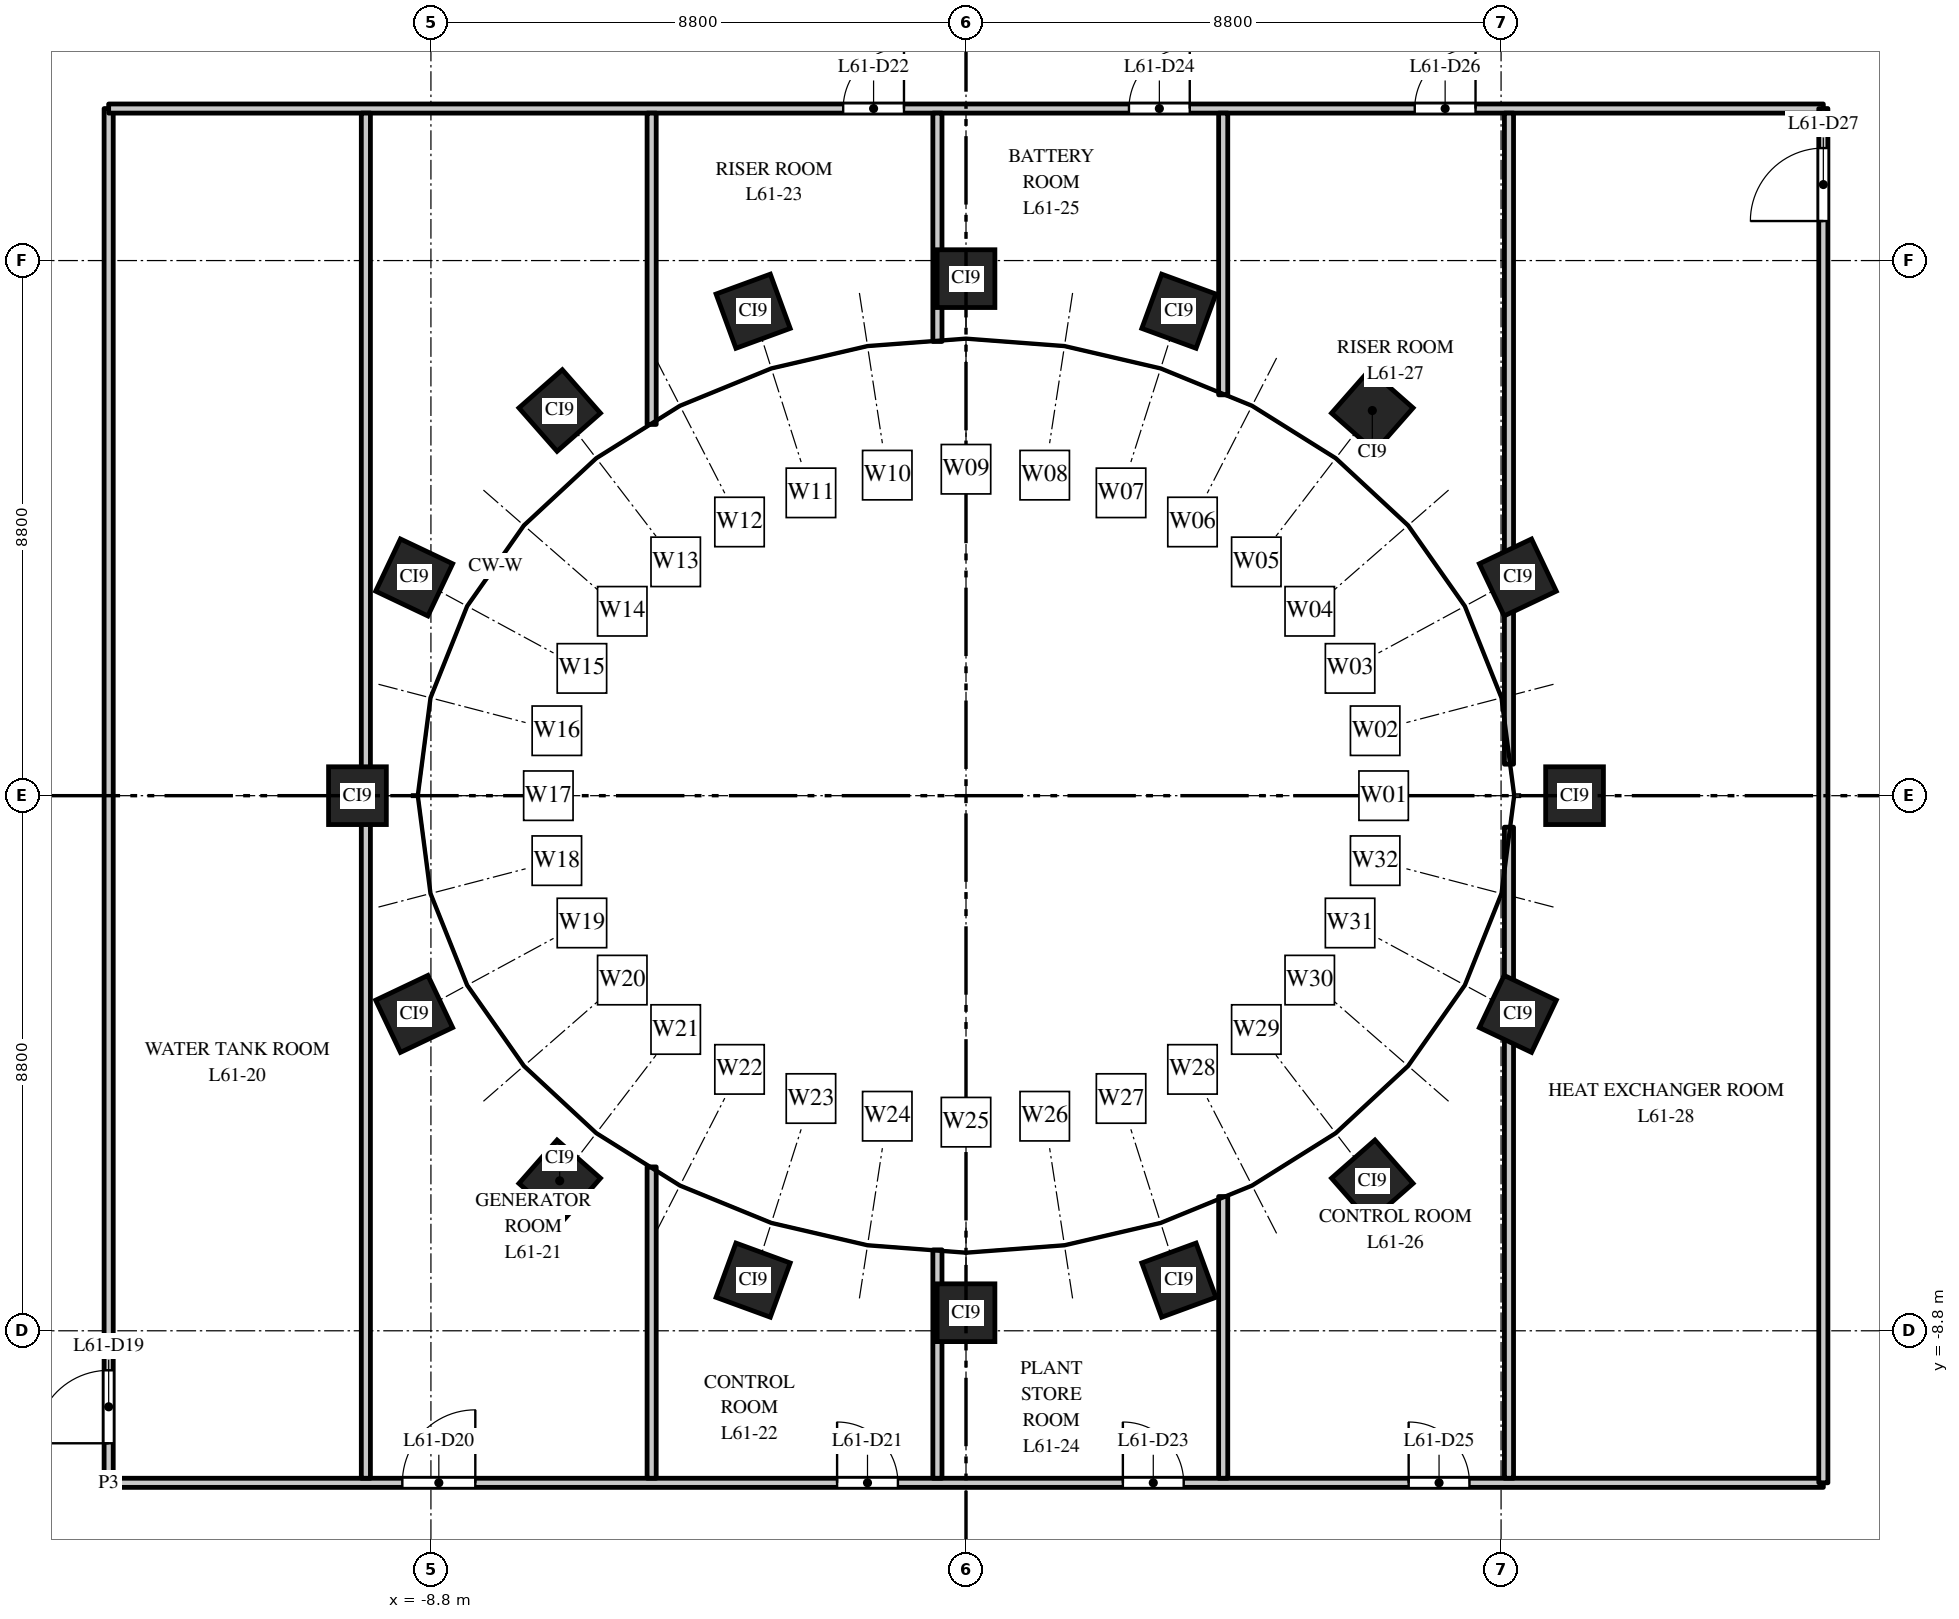
"""IFC4 building model, lengths in metres.
Left out: names, types, materials, properties, quantities, classifications, styles, units other than length and angle.
Written with IfcOpenShell. Run it as: python <this file> out.ifc"""

import sys

from ifc_helpers import new_model, si_unit, direction, frame, frame_2d, origin, origin_2d, place, context, subcontext, project, spatial, rectangle, extrude, element, fill, save


model = new_model("IFC4")
c1 = context("Model", 3, precision=1e-05, world=origin(), true_north=direction((0.0, 1.0)))
c2 = subcontext(c1, "Body", "Model", "MODEL_VIEW")
j1 = project(units=[si_unit("LENGTHUNIT", "METRE"), si_unit("PLANEANGLEUNIT", "RADIAN")], contexts=[c1])
p1 = place(None, origin())
s1 = spatial("IfcSite", under=j1, at=p1, CompositionType="ELEMENT")
p2 = place(p1, origin())
s2 = spatial("IfcBuilding", under=s1, at=p2, CompositionType="ELEMENT")
p3 = place(p2, frame((0.0, 0.0, 285.5)))
s3 = spatial("IfcBuildingStorey", under=s2, at=p3, CompositionType="ELEMENT", Elevation=285.5)
for number, where, z_axis, x_axis in (
    (1, (10.008, 0.0, 0.0), (0.0, 0.0, 1.0), (0.0, 1.0, 0.0)),
    (2, (9.076, 3.588, 0.0), (0.0, 0.0, 1.0), (-0.429, 0.903, 0.0)),
    (3, (6.682, 6.334, 0.0), (0.0, 0.0, 1.0), (-0.751, 0.66, 0.0)),
    (4, (3.501, 7.967, 0.0), (0.0, 0.0, 1.0), (-0.939, 0.344, 0.0)),
    (5, (0.0, 8.503, 0.0), (0.0, 0.0, 1.0), (-1.0, 0.0, 0.0)),
    (6, (-3.501, 7.967, 0.0), (0.0, 0.0, 1.0), (-0.939, -0.344, 0.0)),
    (7, (-6.682, 6.334, 0.0), (0.0, 0.0, 1.0), (-0.751, -0.66, 0.0)),
    (8, (-9.076, 3.588, 0.0), (0.0, 0.0, 1.0), (-0.429, -0.903, 0.0)),
    (9, (-10.008, 0.0, 0.0), (0.0, 0.0, 1.0), (0.0, -1.0, 0.0)),
    (10, (-9.076, -3.588, 0.0), (0.0, 0.0, 1.0), (0.429, -0.903, 0.0)),
    (11, (-6.682, -6.334, 0.0), (0.0, 0.0, 1.0), (0.751, -0.66, 0.0)),
    (12, (-3.501, -7.967, 0.0), (0.0, 0.0, 1.0), (0.939, -0.344, 0.0)),
    (13, (0.0, -8.503, 0.0), (0.0, 0.0, 1.0), (1.0, 0.0, 0.0)),
    (14, (3.501, -7.967, 0.0), (0.0, 0.0, 1.0), (0.939, 0.344, 0.0)),
    (15, (6.682, -6.334, 0.0), (0.0, 0.0, 1.0), (0.751, 0.66, 0.0)),
    (16, (9.076, -3.588, 0.0), (0.0, 0.0, 1.0), (0.429, 0.903, 0.0)),
):
    element("IfcColumn", number, at=place(p3, frame(where, z_axis=z_axis, x_axis=x_axis)), inside=s3, PredefinedType="COLUMN", context=c2, shape_type="SweptSolid", body=[
        extrude(rectangle(XDim=0.95, YDim=0.95, at=origin_2d()), origin(), (0.0, 0.0, 1.0), 5.5),
    ])
p4 = place(p3, frame((-14.1, -11.3, 0.0), z_axis=(0.0, 0.0, 1.0), x_axis=(0.0, 1.0, 0.0)))
e17 = element("IfcWall", 17, at=p4, inside=s3, PredefinedType="PARTITIONING", context=c2, shape_type="SweptSolid", body=[
    extrude(rectangle(XDim=22.6, YDim=0.15, at=frame_2d((11.3, 0.0))), origin(), (0.0, 0.0, 1.0), 4.25),
])
p5 = place(p4, frame((0.65, 0.0, 0.0)))
e18 = element("IfcOpeningElement", 18, at=p5, cuts=e17, PredefinedType="OPENING", context=c2, shape_type="SweptSolid", body=[
    extrude(rectangle(XDim=1.2, YDim=2.1, at=frame_2d((0.6, 1.05))), frame((0.0, 0.085, 0.0), z_axis=(0.0, -1.0, 0.0), x_axis=(1.0, 0.0, 0.0)), (0.0, 0.0, 1.0), 0.17),
])
p6 = place(p3, frame((-14.1, -11.3, 0.0), z_axis=(0.0, 0.0, 1.0), x_axis=(1.0, 0.0, 0.0)))
e19 = element("IfcWall", 19, at=p6, inside=s3, PredefinedType="PARTITIONING", context=c2, shape_type="SweptSolid", body=[
    extrude(rectangle(XDim=28.2, YDim=0.15, at=frame_2d((14.1, 0.0))), origin(), (0.0, 0.0, 1.0), 4.35),
])
p7 = place(p6, frame((4.83, 0.0, 0.0)))
e20 = element("IfcOpeningElement", 20, at=p7, cuts=e19, PredefinedType="OPENING", context=c2, shape_type="SweptSolid", body=[
    extrude(rectangle(XDim=1.2, YDim=2.1, at=frame_2d((0.6, 1.05))), frame((0.0, 0.085, 0.0), z_axis=(0.0, -1.0, 0.0), x_axis=(1.0, 0.0, 0.0)), (0.0, 0.0, 1.0), 0.17),
])
p8 = place(p6, frame((11.98, 0.0, 0.0)))
e21 = element("IfcOpeningElement", 21, at=p8, cuts=e19, PredefinedType="OPENING", context=c2, shape_type="SweptSolid", body=[
    extrude(rectangle(XDim=1.0, YDim=2.1, at=frame_2d((0.5, 1.05))), frame((0.0, 0.085, 0.0), z_axis=(0.0, -1.0, 0.0), x_axis=(1.0, 0.0, 0.0)), (0.0, 0.0, 1.0), 0.17),
])
p9 = place(p6, frame((16.68, 0.0, 0.0)))
e22 = element("IfcOpeningElement", 22, at=p9, cuts=e19, PredefinedType="OPENING", context=c2, shape_type="SweptSolid", body=[
    extrude(rectangle(XDim=1.0, YDim=2.1, at=frame_2d((0.5, 1.05))), frame((0.0, 0.085, 0.0), z_axis=(0.0, -1.0, 0.0), x_axis=(1.0, 0.0, 0.0)), (0.0, 0.0, 1.0), 0.17),
])
p10 = place(p6, frame((21.38, 0.0, 0.0)))
e23 = element("IfcOpeningElement", 23, at=p10, cuts=e19, PredefinedType="OPENING", context=c2, shape_type="SweptSolid", body=[
    extrude(rectangle(XDim=1.0, YDim=2.1, at=frame_2d((0.5, 1.05))), frame((0.0, 0.085, 0.0), z_axis=(0.0, -1.0, 0.0), x_axis=(1.0, 0.0, 0.0)), (0.0, 0.0, 1.0), 0.17),
])
p11 = place(p3, frame((-14.1, 11.3, 0.0), z_axis=(0.0, 0.0, 1.0), x_axis=(1.0, 0.0, 0.0)))
e24 = element("IfcWall", 24, at=p11, inside=s3, PredefinedType="PARTITIONING", context=c2, shape_type="SweptSolid", body=[
    extrude(rectangle(XDim=28.2, YDim=0.15, at=frame_2d((14.1, 0.0))), origin(), (0.0, 0.0, 1.0), 4.35),
])
p12 = place(p11, frame((12.08, 0.0, 0.0)))
e25 = element("IfcOpeningElement", 25, at=p12, cuts=e24, PredefinedType="OPENING", context=c2, shape_type="SweptSolid", body=[
    extrude(rectangle(XDim=1.0, YDim=2.1, at=frame_2d((0.5, 1.05))), frame((0.0, 0.085, 0.0), z_axis=(0.0, -1.0, 0.0), x_axis=(1.0, 0.0, 0.0)), (0.0, 0.0, 1.0), 0.17),
])
p13 = place(p11, frame((16.78, 0.0, 0.0)))
e26 = element("IfcOpeningElement", 26, at=p13, cuts=e24, PredefinedType="OPENING", context=c2, shape_type="SweptSolid", body=[
    extrude(rectangle(XDim=1.0, YDim=2.1, at=frame_2d((0.5, 1.05))), frame((0.0, 0.085, 0.0), z_axis=(0.0, -1.0, 0.0), x_axis=(1.0, 0.0, 0.0)), (0.0, 0.0, 1.0), 0.17),
])
p14 = place(p11, frame((21.48, 0.0, 0.0)))
e27 = element("IfcOpeningElement", 27, at=p14, cuts=e24, PredefinedType="OPENING", context=c2, shape_type="SweptSolid", body=[
    extrude(rectangle(XDim=1.0, YDim=2.1, at=frame_2d((0.5, 1.05))), frame((0.0, 0.085, 0.0), z_axis=(0.0, -1.0, 0.0), x_axis=(1.0, 0.0, 0.0)), (0.0, 0.0, 1.0), 0.17),
])
p15 = place(p3, frame((-9.87, -11.225, 0.0), z_axis=(0.0, 0.0, 1.0), x_axis=(0.0, 1.0, 0.0)))
e28 = element("IfcWall", 28, at=p15, inside=s3, PredefinedType="PARTITIONING", context=c2, shape_type="SweptSolid", body=[
    extrude(rectangle(XDim=22.45, YDim=0.15, at=frame_2d((11.225, 0.0))), origin(), (0.0, 0.0, 1.0), 4.25),
])
for number, where, z_axis, x_axis in (
    (29, (-5.17, -11.225, 0.0), (0.0, 0.0, 1.0), (0.0, 1.0, 0.0)),
    (30, (-5.17, 6.105, 0.0), (0.0, 0.0, 1.0), (0.0, 1.0, 0.0)),
):
    element("IfcWall", number, at=place(p3, frame(where, z_axis=z_axis, x_axis=x_axis)), inside=s3, PredefinedType="PARTITIONING", context=c2, shape_type="SweptSolid", body=[
        extrude(rectangle(XDim=5.12, YDim=0.15, at=frame_2d((2.56, 0.0))), origin(), (0.0, 0.0, 1.0), 4.5),
    ])
for number, where, z_axis, x_axis in (
    (31, (-0.47, -11.225, 0.0), (0.0, 0.0, 1.0), (0.0, 1.0, 0.0)),
    (32, (-0.47, 7.469, 0.0), (0.0, 0.0, 1.0), (0.0, 1.0, 0.0)),
):
    element("IfcWall", number, at=place(p3, frame(where, z_axis=z_axis, x_axis=x_axis)), inside=s3, PredefinedType="PARTITIONING", context=c2, shape_type="SweptSolid", body=[
        extrude(rectangle(XDim=3.756, YDim=0.15, at=frame_2d((1.878, 0.0))), origin(), (0.0, 0.0, 1.0), 4.5),
    ])
for number, where, z_axis, x_axis in (
    (33, (4.23, -11.225, 0.0), (0.0, 0.0, 1.0), (0.0, 1.0, 0.0)),
    (34, (4.23, 6.592, 0.0), (0.0, 0.0, 1.0), (0.0, 1.0, 0.0)),
):
    element("IfcWall", number, at=place(p3, frame(where, z_axis=z_axis, x_axis=x_axis)), inside=s3, PredefinedType="PARTITIONING", context=c2, shape_type="SweptSolid", body=[
        extrude(rectangle(XDim=4.633, YDim=0.15, at=frame_2d((2.316, 0.0))), origin(), (0.0, 0.0, 1.0), 4.5),
    ])
for number, where, z_axis, x_axis in (
    (35, (8.93, -11.225, 0.0), (0.0, 0.0, 1.0), (0.0, 1.0, 0.0)),
    (36, (8.93, 0.518, 0.0), (0.0, 0.0, 1.0), (0.0, 1.0, 0.0)),
):
    element("IfcWall", number, at=place(p3, frame(where, z_axis=z_axis, x_axis=x_axis)), inside=s3, PredefinedType="PARTITIONING", context=c2, shape_type="SweptSolid", body=[
        extrude(rectangle(XDim=10.707, YDim=0.15, at=frame_2d((5.354, 0.0))), origin(), (0.0, 0.0, 1.0), 4.25),
    ])
p16 = place(p3, frame((14.1, -11.3, 0.0), z_axis=(0.0, 0.0, 1.0), x_axis=(0.0, 1.0, 0.0)))
e37 = element("IfcWall", 37, at=p16, inside=s3, PredefinedType="PARTITIONING", context=c2, shape_type="SweptSolid", body=[
    extrude(rectangle(XDim=22.6, YDim=0.15, at=frame_2d((11.3, 0.0))), origin(), (0.0, 0.0, 1.0), 4.25),
])
p17 = place(p16, frame((20.75, 0.0, 0.0)))
e38 = element("IfcOpeningElement", 38, at=p17, cuts=e37, PredefinedType="OPENING", context=c2, shape_type="SweptSolid", body=[
    extrude(rectangle(XDim=1.2, YDim=2.1, at=frame_2d((0.6, 1.05))), frame((0.0, 0.085, 0.0), z_axis=(0.0, -1.0, 0.0), x_axis=(1.0, 0.0, 0.0)), (0.0, 0.0, 1.0), 0.17),
])
p18 = place(p5, origin())
e39 = element("IfcDoor", 39, at=p18, inside=s3, OperationType="SINGLE_SWING_LEFT", PredefinedType="DOOR", context=c2, shape_type="SweptSolid", body=[
    extrude(rectangle(XDim=1.2, YDim=2.1, at=frame_2d((0.6, 1.05))), frame((0.0, 0.025, 0.0), z_axis=(0.0, -1.0, 0.0), x_axis=(1.0, 0.0, 0.0)), (0.0, 0.0, 1.0), 0.05),
])
fill(e18, e39)
p19 = place(p7, origin())
e40 = element("IfcDoor", 40, at=p19, inside=s3, OperationType="SINGLE_SWING_RIGHT", PredefinedType="DOOR", context=c2, shape_type="SweptSolid", body=[
    extrude(rectangle(XDim=1.2, YDim=2.1, at=frame_2d((0.6, 1.05))), frame((0.0, 0.025, 0.0), z_axis=(0.0, -1.0, 0.0), x_axis=(1.0, 0.0, 0.0)), (0.0, 0.0, 1.0), 0.05),
])
fill(e20, e40)
p20 = place(p8, origin())
e41 = element("IfcDoor", 41, at=p20, inside=s3, OperationType="SINGLE_SWING_LEFT", PredefinedType="DOOR", context=c2, shape_type="SweptSolid", body=[
    extrude(rectangle(XDim=1.0, YDim=2.1, at=frame_2d((0.5, 1.05))), frame((0.0, 0.025, 0.0), z_axis=(0.0, -1.0, 0.0), x_axis=(1.0, 0.0, 0.0)), (0.0, 0.0, 1.0), 0.05),
])
fill(e21, e41)
p21 = place(p12, origin())
e42 = element("IfcDoor", 42, at=p21, inside=s3, OperationType="SINGLE_SWING_RIGHT", PredefinedType="DOOR", context=c2, shape_type="SweptSolid", body=[
    extrude(rectangle(XDim=1.0, YDim=2.1, at=frame_2d((0.5, 1.05))), frame((0.0, 0.025, 0.0), z_axis=(0.0, -1.0, 0.0), x_axis=(1.0, 0.0, 0.0)), (0.0, 0.0, 1.0), 0.05),
])
fill(e25, e42)
p22 = place(p9, origin())
e43 = element("IfcDoor", 43, at=p22, inside=s3, OperationType="SINGLE_SWING_LEFT", PredefinedType="DOOR", context=c2, shape_type="SweptSolid", body=[
    extrude(rectangle(XDim=1.0, YDim=2.1, at=frame_2d((0.5, 1.05))), frame((0.0, 0.025, 0.0), z_axis=(0.0, -1.0, 0.0), x_axis=(1.0, 0.0, 0.0)), (0.0, 0.0, 1.0), 0.05),
])
fill(e22, e43)
p23 = place(p13, origin())
e44 = element("IfcDoor", 44, at=p23, inside=s3, OperationType="SINGLE_SWING_RIGHT", PredefinedType="DOOR", context=c2, shape_type="SweptSolid", body=[
    extrude(rectangle(XDim=1.0, YDim=2.1, at=frame_2d((0.5, 1.05))), frame((0.0, 0.025, 0.0), z_axis=(0.0, -1.0, 0.0), x_axis=(1.0, 0.0, 0.0)), (0.0, 0.0, 1.0), 0.05),
])
fill(e26, e44)
p24 = place(p10, origin())
e45 = element("IfcDoor", 45, at=p24, inside=s3, OperationType="SINGLE_SWING_LEFT", PredefinedType="DOOR", context=c2, shape_type="SweptSolid", body=[
    extrude(rectangle(XDim=1.0, YDim=2.1, at=frame_2d((0.5, 1.05))), frame((0.0, 0.025, 0.0), z_axis=(0.0, -1.0, 0.0), x_axis=(1.0, 0.0, 0.0)), (0.0, 0.0, 1.0), 0.05),
])
fill(e23, e45)
p25 = place(p14, origin())
e46 = element("IfcDoor", 46, at=p25, inside=s3, OperationType="SINGLE_SWING_RIGHT", PredefinedType="DOOR", context=c2, shape_type="SweptSolid", body=[
    extrude(rectangle(XDim=1.0, YDim=2.1, at=frame_2d((0.5, 1.05))), frame((0.0, 0.025, 0.0), z_axis=(0.0, -1.0, 0.0), x_axis=(1.0, 0.0, 0.0)), (0.0, 0.0, 1.0), 0.05),
])
fill(e27, e46)
p26 = place(p17, origin())
e47 = element("IfcDoor", 47, at=p26, inside=s3, OperationType="SINGLE_SWING_LEFT", PredefinedType="DOOR", context=c2, shape_type="SweptSolid", body=[
    extrude(rectangle(XDim=1.2, YDim=2.1, at=frame_2d((0.6, 1.05))), frame((0.0, 0.025, 0.0), z_axis=(0.0, -1.0, 0.0), x_axis=(1.0, 0.0, 0.0)), (0.0, 0.0, 1.0), 0.05),
])
fill(e38, e47)
save(model, sys.argv[1])
